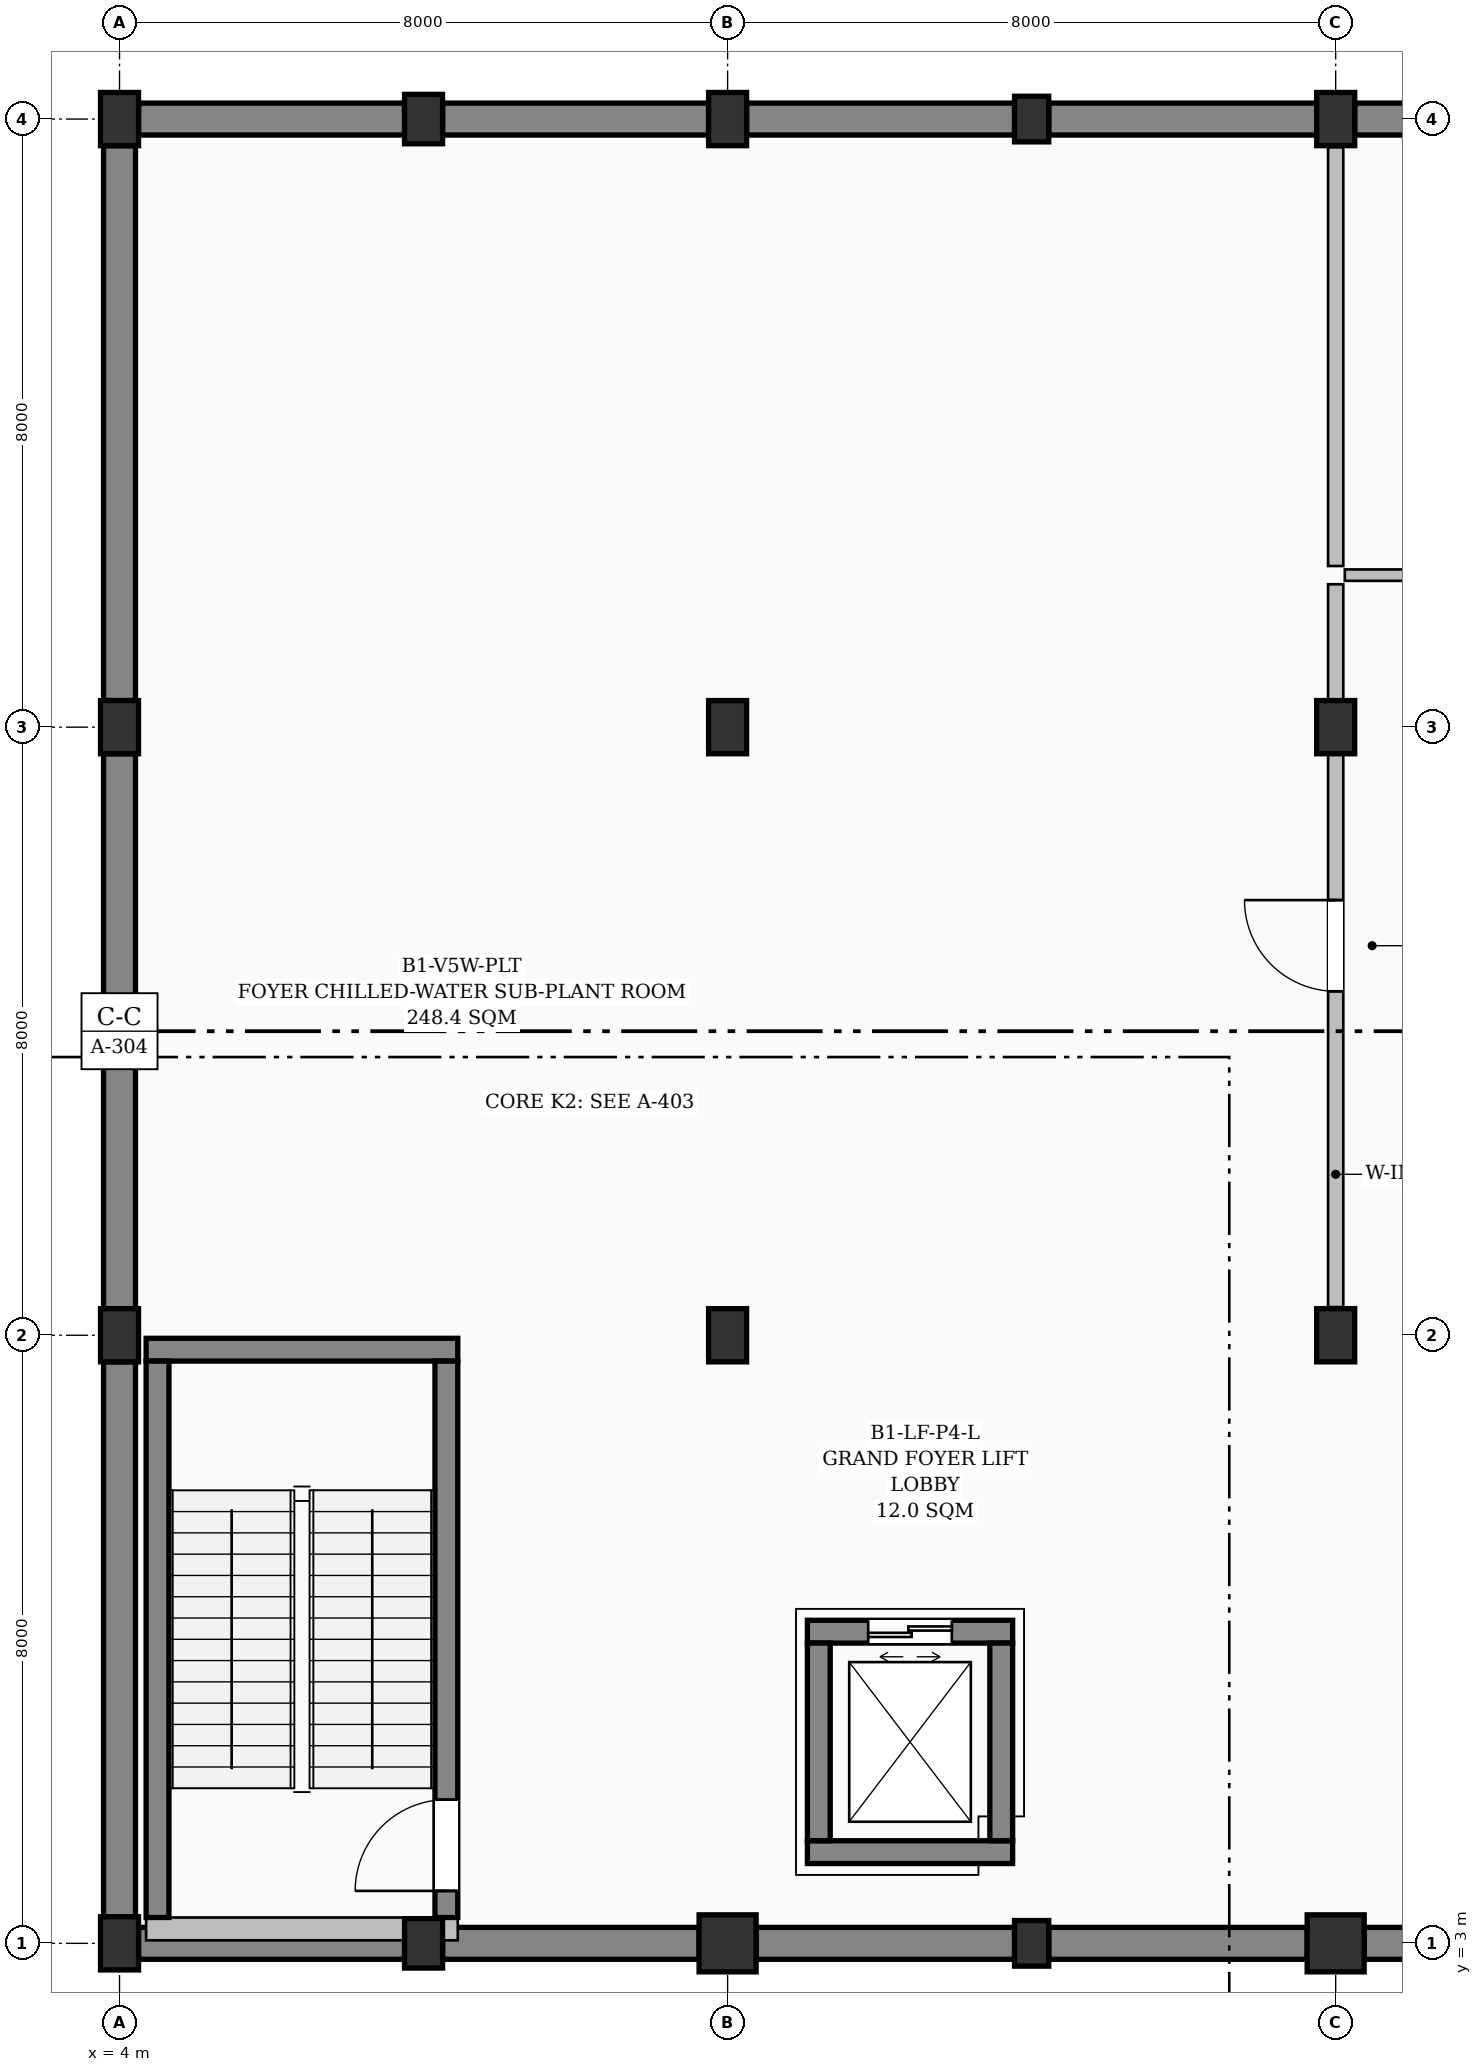
"""IFC4 building model, lengths in metres.
Left out: names, types, materials, properties, quantities, classifications, styles, units other than length and angle.
Written with IfcOpenShell. Run it as: python <this file> out.ifc"""

import sys

from ifc_helpers import new_model, si_unit, direction, frame, frame_2d, origin, origin_2d, place, context, subcontext, project, spatial, rectangle, circle, extrude, element, fill, save


model = new_model("IFC4")
c1 = context("Model", 3, precision=1e-05, world=origin(), true_north=direction((0.0, 1.0)))
c2 = subcontext(c1, "Body", "Model", "MODEL_VIEW")
j1 = project(units=[si_unit("LENGTHUNIT", "METRE"), si_unit("PLANEANGLEUNIT", "RADIAN")], contexts=[c1])
p1 = place(None, origin())
s1 = spatial("IfcSite", under=j1, at=p1, CompositionType="ELEMENT")
p2 = place(p1, origin())
s2 = spatial("IfcBuilding", under=s1, at=p2, CompositionType="ELEMENT")
p3 = place(p2, frame((0.0, 0.0, -4.8)))
s3 = spatial("IfcBuildingStorey", under=s2, at=p3, CompositionType="ELEMENT", Elevation=-4.8)
for number, where, z_axis, x_axis in (
    (1, (4.0, 3.0, -0.38), (0.0, 0.0, 1.0), (1.0, 0.0, 0.0)),
    (2, (4.0, 11.0, -0.38), (0.0, 0.0, 1.0), (1.0, 0.0, 0.0)),
    (3, (4.0, 19.0, -0.38), (0.0, 0.0, 1.0), (1.0, 0.0, 0.0)),
    (4, (4.0, 27.0, -0.38), (0.0, 0.0, 1.0), (1.0, 0.0, 0.0)),
):
    element("IfcColumn", number, at=place(p3, frame(where, z_axis=z_axis, x_axis=x_axis)), inside=s3, PredefinedType="COLUMN", context=c2, shape_type="SweptSolid", body=[
        extrude(rectangle(XDim=0.5, YDim=0.7, at=origin_2d()), origin(), (0.0, 0.0, 1.0), 5.18),
    ])
for number, where, z_axis, x_axis in (
    (5, (8.0, 3.0, -0.38), (0.0, 0.0, 1.0), (1.0, 0.0, 0.0)),
    (6, (8.0, 27.0, -0.38), (0.0, 0.0, 1.0), (1.0, 0.0, 0.0)),
):
    element("IfcColumn", number, at=place(p3, frame(where, z_axis=z_axis, x_axis=x_axis)), inside=s3, PredefinedType="PILASTER", context=c2, shape_type="SweptSolid", body=[
        extrude(rectangle(XDim=0.5, YDim=0.65, at=origin_2d()), origin(), (0.0, 0.0, 1.0), 5.18),
    ])
p4 = place(p3, frame((12.0, 3.0, -0.38), z_axis=(0.0, 0.0, 1.0), x_axis=(1.0, 0.0, 0.0)))
e7 = element("IfcColumn", 7, at=p4, inside=s3, PredefinedType="COLUMN", context=c2, shape_type="SweptSolid", body=[
    extrude(circle(Radius=0.375, at=origin_2d()), origin(), (0.0, 0.0, 1.0), 5.18),
])
for number, where, z_axis, x_axis in (
    (8, (12.0, 11.0, -0.38), (0.0, 0.0, 1.0), (1.0, 0.0, 0.0)),
    (9, (12.0, 19.0, -0.38), (0.0, 0.0, 1.0), (1.0, 0.0, 0.0)),
    (10, (12.0, 27.0, -0.38), (0.0, 0.0, 1.0), (1.0, 0.0, 0.0)),
):
    element("IfcColumn", number, at=place(p3, frame(where, z_axis=z_axis, x_axis=x_axis)), inside=s3, PredefinedType="COLUMN", context=c2, shape_type="SweptSolid", body=[
        extrude(rectangle(XDim=0.5, YDim=0.7, at=origin_2d()), origin(), (0.0, 0.0, 1.0), 5.18),
    ])
for number, where, z_axis, x_axis in (
    (11, (16.0, 3.0, -0.38), (0.0, 0.0, 1.0), (1.0, 0.0, 0.0)),
    (12, (16.0, 27.0, -0.38), (0.0, 0.0, 1.0), (1.0, 0.0, 0.0)),
):
    element("IfcColumn", number, at=place(p3, frame(where, z_axis=z_axis, x_axis=x_axis)), inside=s3, PredefinedType="PILASTER", context=c2, shape_type="SweptSolid", body=[
        extrude(rectangle(XDim=0.45, YDim=0.6, at=origin_2d()), origin(), (0.0, 0.0, 1.0), 5.18),
    ])
p5 = place(p3, frame((20.0, 3.0, -0.38), z_axis=(0.0, 0.0, 1.0), x_axis=(1.0, 0.0, 0.0)))
e13 = element("IfcColumn", 13, at=p5, inside=s3, PredefinedType="COLUMN", context=c2, shape_type="SweptSolid", body=[
    extrude(circle(Radius=0.375, at=origin_2d()), origin(), (0.0, 0.0, 1.0), 5.18),
])
for number, where, z_axis, x_axis in (
    (14, (20.0, 11.0, -0.38), (0.0, 0.0, 1.0), (1.0, 0.0, 0.0)),
    (15, (20.0, 19.0, -0.38), (0.0, 0.0, 1.0), (1.0, 0.0, 0.0)),
    (16, (20.0, 27.0, -0.38), (0.0, 0.0, 1.0), (1.0, 0.0, 0.0)),
):
    element("IfcColumn", number, at=place(p3, frame(where, z_axis=z_axis, x_axis=x_axis)), inside=s3, PredefinedType="COLUMN", context=c2, shape_type="SweptSolid", body=[
        extrude(rectangle(XDim=0.5, YDim=0.7, at=origin_2d()), origin(), (0.0, 0.0, 1.0), 5.18),
    ])
for number, where, z_axis, x_axis in (
    (17, (4.0, 3.35, 0.0), (0.0, 0.0, 1.0), (0.0, 1.0, 0.0)),
    (18, (4.0, 11.35, 0.0), (0.0, 0.0, 1.0), (0.0, 1.0, 0.0)),
    (19, (4.0, 19.35, 0.0), (0.0, 0.0, 1.0), (0.0, 1.0, 0.0)),
):
    element("IfcWall", number, at=place(p3, frame(where, z_axis=z_axis, x_axis=x_axis)), inside=s3, PredefinedType="USERDEFINED", context=c2, shape_type="SweptSolid", body=[
        extrude(rectangle(XDim=7.3, YDim=0.42, at=frame_2d((3.65, 0.0))), origin(), (0.0, 0.0, 1.0), 3.85),
    ])
for number, where, z_axis, x_axis in (
    (20, (4.25, 27.0, 0.0), (0.0, 0.0, 1.0), (1.0, 0.0, 0.0)),
    (21, (8.25, 27.0, 0.0), (0.0, 0.0, 1.0), (1.0, 0.0, 0.0)),
):
    element("IfcWall", number, at=place(p3, frame(where, z_axis=z_axis, x_axis=x_axis)), inside=s3, PredefinedType="USERDEFINED", context=c2, shape_type="SweptSolid", body=[
        extrude(rectangle(XDim=3.5, YDim=0.42, at=frame_2d((1.75, 0.0))), origin(), (0.0, 0.0, 1.0), 3.85),
    ])
for number, where, z_axis, x_axis in (
    (22, (12.25, 27.0, 0.0), (0.0, 0.0, 1.0), (1.0, 0.0, 0.0)),
    (23, (16.225, 27.0, 0.0), (0.0, 0.0, 1.0), (1.0, 0.0, 0.0)),
):
    element("IfcWall", number, at=place(p3, frame(where, z_axis=z_axis, x_axis=x_axis)), inside=s3, PredefinedType="USERDEFINED", context=c2, shape_type="SweptSolid", body=[
        extrude(rectangle(XDim=3.525, YDim=0.42, at=frame_2d((1.762, 0.0))), origin(), (0.0, 0.0, 1.0), 3.85),
    ])
p6 = place(p3, frame((20.25, 27.0, 0.0), z_axis=(0.0, 0.0, 1.0), x_axis=(1.0, 0.0, 0.0)))
e24 = element("IfcWall", 24, at=p6, inside=s3, PredefinedType="USERDEFINED", context=c2, shape_type="SweptSolid", body=[
    extrude(rectangle(XDim=3.55, YDim=0.42, at=frame_2d((1.775, 0.0))), origin(), (0.0, 0.0, 1.0), 3.85),
])
p7 = place(p3, frame((23.8, 3.0, 0.0), z_axis=(0.0, 0.0, 1.0), x_axis=(-1.0, 0.0, 0.0)))
e25 = element("IfcWall", 25, at=p7, inside=s3, PredefinedType="USERDEFINED", context=c2, shape_type="SweptSolid", body=[
    extrude(rectangle(XDim=3.425, YDim=0.42, at=frame_2d((1.712, 0.0))), origin(), (0.0, 0.0, 1.0), 3.85),
])
for number, where, z_axis, x_axis in (
    (26, (19.625, 3.0, 0.0), (0.0, 0.0, 1.0), (-1.0, 0.0, 0.0)),
    (27, (15.775, 3.0, 0.0), (0.0, 0.0, 1.0), (-1.0, 0.0, 0.0)),
):
    element("IfcWall", number, at=place(p3, frame(where, z_axis=z_axis, x_axis=x_axis)), inside=s3, PredefinedType="USERDEFINED", context=c2, shape_type="SweptSolid", body=[
        extrude(rectangle(XDim=3.4, YDim=0.42, at=frame_2d((1.7, 0.0))), origin(), (0.0, 0.0, 1.0), 3.85),
    ])
p8 = place(p3, frame((11.625, 3.0, 0.0), z_axis=(0.0, 0.0, 1.0), x_axis=(-1.0, 0.0, 0.0)))
e28 = element("IfcWall", 28, at=p8, inside=s3, PredefinedType="USERDEFINED", context=c2, shape_type="SweptSolid", body=[
    extrude(rectangle(XDim=3.375, YDim=0.42, at=frame_2d((1.688, 0.0))), origin(), (0.0, 0.0, 1.0), 3.85),
])
p9 = place(p3, frame((7.75, 3.0, 0.0), z_axis=(0.0, 0.0, 1.0), x_axis=(-1.0, 0.0, 0.0)))
e29 = element("IfcWall", 29, at=p9, inside=s3, PredefinedType="USERDEFINED", context=c2, shape_type="SweptSolid", body=[
    extrude(rectangle(XDim=3.5, YDim=0.42, at=frame_2d((1.75, 0.0))), origin(), (0.0, 0.0, 1.0), 3.85),
])
p10 = place(p3, frame((4.35, 3.19, 3.85), z_axis=(0.0, 0.0, 1.0), x_axis=(1.0, 0.0, 0.0)))
e30 = element("IfcWall", 30, at=p10, inside=s3, PredefinedType="SHEAR", context=c2, shape_type="SweptSolid", body=[
    extrude(rectangle(XDim=4.1, YDim=0.3, at=frame_2d((2.05, 0.0))), origin(), (0.0, 0.0, 1.0), 0.65),
])
p11 = place(p3, frame((8.45, 10.81, -0.38), z_axis=(0.0, 0.0, 1.0), x_axis=(-1.0, 0.0, 0.0)))
e31 = element("IfcWall", 31, at=p11, inside=s3, PredefinedType="SHEAR", context=c2, shape_type="SweptSolid", body=[
    extrude(rectangle(XDim=4.1, YDim=0.3, at=frame_2d((2.05, 0.0))), origin(), (0.0, 0.0, 1.0), 4.88),
])
p12 = place(p3, frame((4.5, 3.34, -0.38), z_axis=(0.0, 0.0, 1.0), x_axis=(0.0, 1.0, 0.0)))
e32 = element("IfcWall", 32, at=p12, inside=s3, PredefinedType="SHEAR", context=c2, shape_type="SweptSolid", body=[
    extrude(rectangle(XDim=7.32, YDim=0.3, at=frame_2d((3.66, 0.0))), origin(), (0.0, 0.0, 1.0), 4.88),
])
p13 = place(p3, frame((8.3, 3.34, -0.38), z_axis=(0.0, 0.0, 1.0), x_axis=(0.0, 1.0, 0.0)))
e33 = element("IfcWall", 33, at=p13, inside=s3, PredefinedType="SHEAR", context=c2, shape_type="SweptSolid", body=[
    extrude(rectangle(XDim=7.32, YDim=0.3, at=frame_2d((3.66, 0.0))), origin(), (0.0, 0.0, 1.0), 4.88),
])
p14 = place(p13, frame((0.35, 0.0, 0.38)))
e34 = element("IfcOpeningElement", 34, at=p14, cuts=e33, PredefinedType="OPENING", context=c2, shape_type="SweptSolid", body=[
    extrude(rectangle(XDim=1.2, YDim=2.15, at=frame_2d((0.6, 1.075))), frame((0.0, 0.16, 0.0), z_axis=(0.0, -1.0, 0.0), x_axis=(1.0, 0.0, 0.0)), (0.0, 0.0, 1.0), 0.32),
])
p15 = place(p3, frame((13.05, 4.2, -1.2), z_axis=(0.0, 0.0, 1.0), x_axis=(1.0, 0.0, 0.0)))
e35 = element("IfcWall", 35, at=p15, inside=s3, PredefinedType="SHEAR", context=c2, shape_type="SweptSolid", body=[
    extrude(rectangle(XDim=2.7, YDim=0.3, at=frame_2d((1.35, 0.0))), origin(), (0.0, 0.0, 1.0), 5.7),
])
p16 = place(p3, frame((15.75, 7.1, -1.2), z_axis=(0.0, 0.0, 1.0), x_axis=(-1.0, 0.0, 0.0)))
e36 = element("IfcWall", 36, at=p16, inside=s3, PredefinedType="SHEAR", context=c2, shape_type="SweptSolid", body=[
    extrude(rectangle(XDim=2.7, YDim=0.3, at=frame_2d((1.35, 0.0))), origin(), (0.0, 0.0, 1.0), 5.7),
])
p17 = place(p16, frame((0.8, 0.0, 1.2)))
e37 = element("IfcOpeningElement", 37, at=p17, cuts=e36, PredefinedType="OPENING", context=c2, shape_type="SweptSolid", body=[
    extrude(rectangle(XDim=1.1, YDim=2.15, at=frame_2d((0.55, 1.075))), frame((0.0, 0.16, 0.0), z_axis=(0.0, -1.0, 0.0), x_axis=(1.0, 0.0, 0.0)), (0.0, 0.0, 1.0), 0.32),
])
for number, where, z_axis, x_axis in (
    (38, (13.2, 4.35, -1.2), (0.0, 0.0, 1.0), (0.0, 1.0, 0.0)),
    (39, (15.6, 6.95, -1.2), (0.0, 0.0, 1.0), (0.0, -1.0, 0.0)),
):
    element("IfcWall", number, at=place(p3, frame(where, z_axis=z_axis, x_axis=x_axis)), inside=s3, PredefinedType="SHEAR", context=c2, shape_type="SweptSolid", body=[
        extrude(rectangle(XDim=2.6, YDim=0.3, at=frame_2d((1.3, 0.0))), origin(), (0.0, 0.0, 1.0), 5.7),
    ])
p18 = place(p3, frame((20.12, 21.0, 0.0), z_axis=(0.0, 0.0, 1.0), x_axis=(1.0, 0.0, 0.0)))
e40 = element("IfcWall", 40, at=p18, inside=s3, PredefinedType="PARTITIONING", context=c2, shape_type="SweptSolid", body=[
    extrude(rectangle(XDim=31.76, YDim=0.15, at=frame_2d((15.88, 0.0))), origin(), (0.0, 0.0, 1.0), 4.5),
])
p19 = place(p18, frame((4.576, 0.0, 0.0)))
e41 = element("IfcOpeningElement", 41, at=p19, cuts=e40, PredefinedType="OPENING", context=c2, shape_type="SweptSolid", body=[
    extrude(rectangle(XDim=1.25, YDim=2.15, at=frame_2d((0.625, 1.075))), frame((0.0, 0.085, 0.0), z_axis=(0.0, -1.0, 0.0), x_axis=(1.0, 0.0, 0.0)), (0.0, 0.0, 1.0), 0.17),
])
p20 = place(p3, frame((20.0, 11.37, 0.0), z_axis=(0.0, 0.0, 1.0), x_axis=(0.0, 1.0, 0.0)))
e42 = element("IfcWall", 42, at=p20, inside=s3, PredefinedType="PARTITIONING", context=c2, shape_type="SweptSolid", body=[
    extrude(rectangle(XDim=9.51, YDim=0.2, at=frame_2d((4.755, 0.0))), origin(), (0.0, 0.0, 1.0), 4.095),
])
p21 = place(p20, frame((4.155, 0.0, 0.0)))
e43 = element("IfcOpeningElement", 43, at=p21, cuts=e42, PredefinedType="OPENING", context=c2, shape_type="SweptSolid", body=[
    extrude(rectangle(XDim=1.2, YDim=2.2, at=frame_2d((0.6, 1.1))), frame((0.0, 0.11, 0.0), z_axis=(0.0, -1.0, 0.0), x_axis=(1.0, 0.0, 0.0)), (0.0, 0.0, 1.0), 0.22),
])
p22 = place(p3, frame((20.0, 21.12, 0.0), z_axis=(0.0, 0.0, 1.0), x_axis=(0.0, 1.0, 0.0)))
e44 = element("IfcWall", 44, at=p22, inside=s3, PredefinedType="PARTITIONING", context=c2, shape_type="SweptSolid", body=[
    extrude(rectangle(XDim=5.51, YDim=0.2, at=frame_2d((2.755, 0.0))), origin(), (0.0, 0.0, 1.0), 4.095),
])
p23 = place(p14, origin())
e45 = element("IfcDoor", 45, at=p23, inside=s3, OperationType="SINGLE_SWING_LEFT", PredefinedType="DOOR", context=c2, shape_type="SweptSolid", body=[
    extrude(rectangle(XDim=1.2, YDim=2.15, at=frame_2d((0.6, 1.075))), frame((0.0, 0.025, 0.0), z_axis=(0.0, -1.0, 0.0), x_axis=(1.0, 0.0, 0.0)), (0.0, 0.0, 1.0), 0.05),
])
fill(e34, e45)
p24 = place(p17, origin())
e46 = element("IfcDoor", 46, at=p24, inside=s3, OperationType="DOUBLE_DOOR_SLIDING", PredefinedType="DOOR", context=c2, shape_type="SweptSolid", body=[
    extrude(rectangle(XDim=1.1, YDim=2.15, at=frame_2d((0.55, 1.075))), frame((0.0, 0.025, 0.0), z_axis=(0.0, -1.0, 0.0), x_axis=(1.0, 0.0, 0.0)), (0.0, 0.0, 1.0), 0.05),
])
fill(e37, e46)
p25 = place(p21, origin())
e47 = element("IfcDoor", 47, at=p25, inside=s3, OperationType="SINGLE_SWING_RIGHT", PredefinedType="DOOR", context=c2, shape_type="SweptSolid", body=[
    extrude(rectangle(XDim=1.2, YDim=2.2, at=frame_2d((0.6, 1.1))), frame((0.0, 0.025, 0.0), z_axis=(0.0, -1.0, 0.0), x_axis=(1.0, 0.0, 0.0)), (0.0, 0.0, 1.0), 0.05),
])
fill(e43, e47)
save(model, sys.argv[1])
